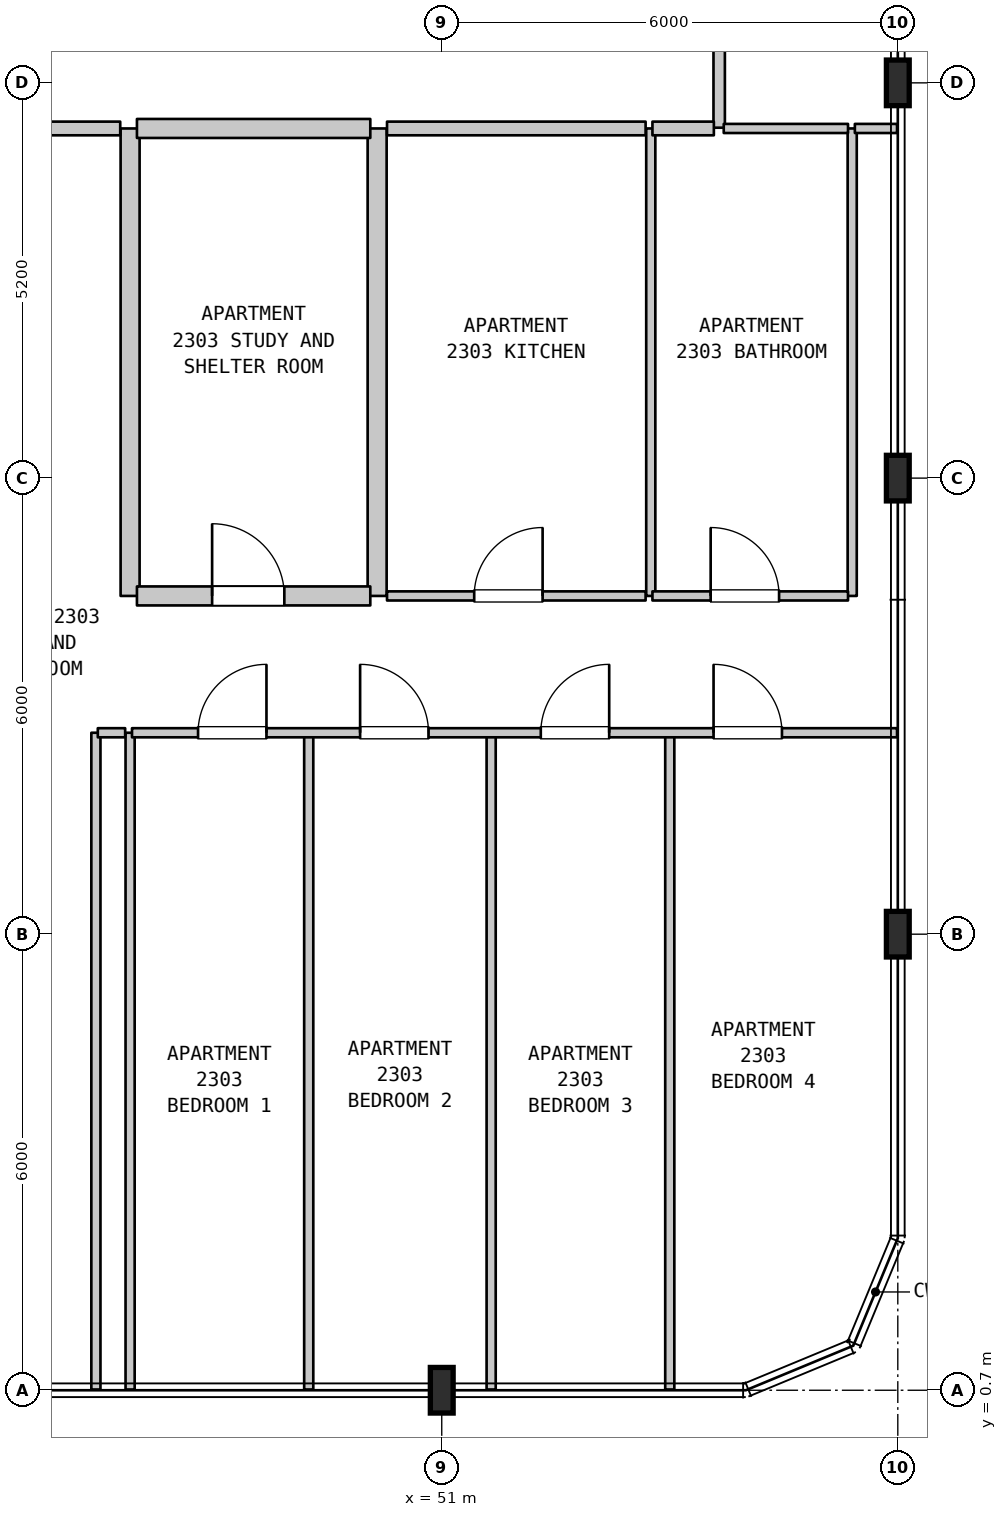
"""IFC4 building model, lengths in metres.
Left out: names, types, materials, properties, quantities, classifications, styles, units other than length and angle.
Written with IfcOpenShell. Run it as: python <this file> out.ifc"""

import sys

from ifc_helpers import new_model, si_unit, direction, frame, frame_2d, origin, origin_2d, place, context, subcontext, project, spatial, rectangle, i_section, extrude, element, fill, save


model = new_model("IFC4")
c1 = context("Model", 3, precision=1e-05, world=origin(), true_north=direction((0.0, 1.0)))
c2 = subcontext(c1, "Body", "Model", "MODEL_VIEW")
j1 = project(units=[si_unit("LENGTHUNIT", "METRE"), si_unit("PLANEANGLEUNIT", "RADIAN")], contexts=[c1])
p1 = place(None, origin())
s1 = spatial("IfcSite", under=j1, at=p1, CompositionType="ELEMENT")
p2 = place(p1, origin())
s2 = spatial("IfcBuilding", under=s1, at=p2, CompositionType="ELEMENT")
p3 = place(p2, frame((0.0, 0.0, 98.3)))
s3 = spatial("IfcBuildingStorey", under=s2, at=p3, CompositionType="ELEMENT", Elevation=98.3)
for number, where, z_axis, x_axis in (
    (1, (51.0, 0.7, 0.0), (0.0, 0.0, 1.0), (1.0, 0.0, 0.0)),
    (2, (57.0, 6.7, 0.0), (0.0, 0.0, 1.0), (1.0, 0.0, 0.0)),
    (3, (57.0, 12.7, 0.0), (0.0, 0.0, 1.0), (1.0, 0.0, 0.0)),
    (4, (57.0, 17.9, 0.0), (0.0, 0.0, 1.0), (1.0, 0.0, 0.0)),
):
    element("IfcColumn", number, at=place(p3, frame(where, z_axis=z_axis, x_axis=x_axis)), inside=s3, PredefinedType="COLUMN", context=c2, shape_type="SweptSolid", body=[
        extrude(i_section(OverallWidth=0.3, OverallDepth=0.6, WebThickness=0.015, FlangeThickness=0.03, FilletRadius=0.027, at=origin_2d()), origin(), (0.0, 0.0, 1.0), 3.7),
    ])
for number, where, z_axis, x_axis in (
    (5, (46.45, 0.71, 0.0), (0.0, 0.0, 1.0), (0.0, 1.0, 0.0)),
    (6, (46.9, 0.71, 0.0), (0.0, 0.0, 1.0), (0.0, 1.0, 0.0)),
):
    element("IfcWall", number, at=place(p3, frame(where, z_axis=z_axis, x_axis=x_axis)), inside=s3, PredefinedType="PARTITIONING", context=c2, shape_type="SweptSolid", body=[
        extrude(rectangle(XDim=8.64, YDim=0.12, at=frame_2d((4.32, 0.0))), origin(), (0.0, 0.0, 1.0), 3.385),
    ])
p4 = place(p3, frame((46.9, 11.15, 0.0), z_axis=(0.0, 0.0, 1.0), x_axis=(0.0, 1.0, 0.0)))
e7 = element("IfcWall", 7, at=p4, inside=s3, PredefinedType="STANDARD", context=c2, shape_type="SweptSolid", body=[
    extrude(rectangle(XDim=6.15, YDim=0.25, at=frame_2d((3.075, 0.0))), origin(), (0.0, 0.0, 1.0), 3.385),
])
p5 = place(p3, frame((49.25, 0.71, 0.0), z_axis=(0.0, 0.0, 1.0), x_axis=(0.0, 1.0, 0.0)))
e8 = element("IfcWall", 8, at=p5, inside=s3, PredefinedType="PARTITIONING", context=c2, shape_type="SweptSolid", body=[
    extrude(rectangle(XDim=8.64, YDim=0.12, at=frame_2d((4.32, 0.0))), origin(), (0.0, 0.0, 1.0), 3.385),
])
p6 = place(p3, frame((50.15, 11.15, 0.0), z_axis=(0.0, 0.0, 1.0), x_axis=(0.0, 1.0, 0.0)))
e9 = element("IfcWall", 9, at=p6, inside=s3, PredefinedType="STANDARD", context=c2, shape_type="SweptSolid", body=[
    extrude(rectangle(XDim=6.15, YDim=0.25, at=frame_2d((3.075, 0.0))), origin(), (0.0, 0.0, 1.0), 3.385),
])
p7 = place(p3, frame((51.65, 0.71, 0.0), z_axis=(0.0, 0.0, 1.0), x_axis=(0.0, 1.0, 0.0)))
e10 = element("IfcWall", 10, at=p7, inside=s3, PredefinedType="PARTITIONING", context=c2, shape_type="SweptSolid", body=[
    extrude(rectangle(XDim=8.64, YDim=0.12, at=frame_2d((4.32, 0.0))), origin(), (0.0, 0.0, 1.0), 3.385),
])
p8 = place(p3, frame((53.75, 11.15, 0.0), z_axis=(0.0, 0.0, 1.0), x_axis=(0.0, 1.0, 0.0)))
e11 = element("IfcWall", 11, at=p8, inside=s3, PredefinedType="PARTITIONING", context=c2, shape_type="SweptSolid", body=[
    extrude(rectangle(XDim=6.15, YDim=0.12, at=frame_2d((3.075, 0.0))), origin(), (0.0, 0.0, 1.0), 3.385),
])
p9 = place(p3, frame((54.0, 0.71, 0.0), z_axis=(0.0, 0.0, 1.0), x_axis=(0.0, 1.0, 0.0)))
e12 = element("IfcWall", 12, at=p9, inside=s3, PredefinedType="PARTITIONING", context=c2, shape_type="SweptSolid", body=[
    extrude(rectangle(XDim=8.64, YDim=0.12, at=frame_2d((4.32, 0.0))), origin(), (0.0, 0.0, 1.0), 3.385),
])
p10 = place(p3, frame((54.65, 17.31, 0.0), z_axis=(0.0, 0.0, 1.0), x_axis=(0.0, 1.0, 0.0)))
e13 = element("IfcWall", 13, at=p10, inside=s3, PredefinedType="STANDARD", context=c2, shape_type="SweptSolid", body=[
    extrude(rectangle(XDim=2.19, YDim=0.15, at=frame_2d((1.095, 0.0))), origin(), (0.0, 0.0, 1.0), 3.385),
])
p11 = place(p3, frame((56.4, 11.15, 0.0), z_axis=(0.0, 0.0, 1.0), x_axis=(0.0, 1.0, 0.0)))
e14 = element("IfcWall", 14, at=p11, inside=s3, PredefinedType="PARTITIONING", context=c2, shape_type="SweptSolid", body=[
    extrude(rectangle(XDim=6.15, YDim=0.12, at=frame_2d((3.075, 0.0))), origin(), (0.0, 0.0, 1.0), 3.385),
])
p12 = place(p3, frame((46.475, 9.35, 0.0), z_axis=(0.0, 0.0, 1.0), x_axis=(1.0, 0.0, 0.0)))
e15 = element("IfcWall", 15, at=p12, inside=s3, PredefinedType="PARTITIONING", context=c2, shape_type="SweptSolid", body=[
    extrude(rectangle(XDim=0.36, YDim=0.12, at=frame_2d((0.18, 0.0))), origin(), (0.0, 0.0, 1.0), 3.385),
])
p13 = place(p3, frame((46.925, 9.35, 0.0), z_axis=(0.0, 0.0, 1.0), x_axis=(1.0, 0.0, 0.0)))
e16 = element("IfcWall", 16, at=p13, inside=s3, PredefinedType="PARTITIONING", context=c2, shape_type="SweptSolid", body=[
    extrude(rectangle(XDim=10.065, YDim=0.12, at=frame_2d((5.032, 0.0))), origin(), (0.0, 0.0, 1.0), 3.385),
])
p14 = place(p13, frame((0.869, 0.0, 0.0)))
e17 = element("IfcOpeningElement", 17, at=p14, cuts=e16, PredefinedType="OPENING", context=c2, shape_type="SweptSolid", body=[
    extrude(rectangle(XDim=0.9, YDim=2.15, at=frame_2d((0.45, 1.075))), frame((0.0, 0.07, 0.0), z_axis=(0.0, -1.0, 0.0), x_axis=(1.0, 0.0, 0.0)), (0.0, 0.0, 1.0), 0.14),
])
p15 = place(p13, frame((3.001, 0.0, 0.0)))
e18 = element("IfcOpeningElement", 18, at=p15, cuts=e16, PredefinedType="OPENING", context=c2, shape_type="SweptSolid", body=[
    extrude(rectangle(XDim=0.9, YDim=2.15, at=frame_2d((0.45, 1.075))), frame((0.0, 0.07, 0.0), z_axis=(0.0, -1.0, 0.0), x_axis=(1.0, 0.0, 0.0)), (0.0, 0.0, 1.0), 0.14),
])
p16 = place(p13, frame((5.378, 0.0, 0.0)))
e19 = element("IfcOpeningElement", 19, at=p16, cuts=e16, PredefinedType="OPENING", context=c2, shape_type="SweptSolid", body=[
    extrude(rectangle(XDim=0.9, YDim=2.15, at=frame_2d((0.45, 1.075))), frame((0.0, 0.07, 0.0), z_axis=(0.0, -1.0, 0.0), x_axis=(1.0, 0.0, 0.0)), (0.0, 0.0, 1.0), 0.14),
])
p17 = place(p13, frame((7.651, 0.0, 0.0)))
e20 = element("IfcOpeningElement", 20, at=p17, cuts=e16, PredefinedType="OPENING", context=c2, shape_type="SweptSolid", body=[
    extrude(rectangle(XDim=0.9, YDim=2.15, at=frame_2d((0.45, 1.075))), frame((0.0, 0.07, 0.0), z_axis=(0.0, -1.0, 0.0), x_axis=(1.0, 0.0, 0.0)), (0.0, 0.0, 1.0), 0.14),
])
p18 = place(p3, frame((46.99, 11.15, 0.0), z_axis=(0.0, 0.0, 1.0), x_axis=(1.0, 0.0, 0.0)))
e21 = element("IfcWall", 21, at=p18, inside=s3, PredefinedType="STANDARD", context=c2, shape_type="SweptSolid", body=[
    extrude(rectangle(XDim=3.07, YDim=0.25, at=frame_2d((1.535, 0.0))), origin(), (0.0, 0.0, 1.0), 3.385),
])
p19 = place(p18, frame((0.989, 0.0, 0.0)))
e22 = element("IfcOpeningElement", 22, at=p19, cuts=e21, PredefinedType="OPENING", context=c2, shape_type="SweptSolid", body=[
    extrude(rectangle(XDim=0.95, YDim=2.15, at=frame_2d((0.475, 1.075))), frame((0.0, 0.135, 0.0), z_axis=(0.0, -1.0, 0.0), x_axis=(1.0, 0.0, 0.0)), (0.0, 0.0, 1.0), 0.27),
])
p20 = place(p3, frame((50.28, 11.15, 0.0), z_axis=(0.0, 0.0, 1.0), x_axis=(1.0, 0.0, 0.0)))
e23 = element("IfcWall", 23, at=p20, inside=s3, PredefinedType="PARTITIONING", context=c2, shape_type="SweptSolid", body=[
    extrude(rectangle(XDim=3.402, YDim=0.12, at=frame_2d((1.701, 0.0))), origin(), (0.0, 0.0, 1.0), 3.385),
])
p21 = place(p20, frame((1.147, 0.0, 0.0)))
e24 = element("IfcOpeningElement", 24, at=p21, cuts=e23, PredefinedType="OPENING", context=c2, shape_type="SweptSolid", body=[
    extrude(rectangle(XDim=0.9, YDim=2.15, at=frame_2d((0.45, 1.075))), frame((0.0, 0.07, 0.0), z_axis=(0.0, -1.0, 0.0), x_axis=(1.0, 0.0, 0.0)), (0.0, 0.0, 1.0), 0.14),
])
p22 = place(p3, frame((53.772, 11.15, 0.0), z_axis=(0.0, 0.0, 1.0), x_axis=(1.0, 0.0, 0.0)))
e25 = element("IfcWall", 25, at=p22, inside=s3, PredefinedType="PARTITIONING", context=c2, shape_type="SweptSolid", body=[
    extrude(rectangle(XDim=2.573, YDim=0.12, at=frame_2d((1.287, 0.0))), origin(), (0.0, 0.0, 1.0), 3.385),
])
p23 = place(p22, frame((0.766, 0.0, 0.0)))
e26 = element("IfcOpeningElement", 26, at=p23, cuts=e25, PredefinedType="OPENING", context=c2, shape_type="SweptSolid", body=[
    extrude(rectangle(XDim=0.9, YDim=2.1, at=frame_2d((0.45, 1.05))), frame((0.0, 0.07, 0.0), z_axis=(0.0, -1.0, 0.0), x_axis=(1.0, 0.0, 0.0)), (0.0, 0.0, 1.0), 0.14),
])
p24 = place(p3, frame((41.225, 17.3, 0.0), z_axis=(0.0, 0.0, 1.0), x_axis=(1.0, 0.0, 0.0)))
e27 = element("IfcWall", 27, at=p24, inside=s3, PredefinedType="STANDARD", context=c2, shape_type="SweptSolid", body=[
    extrude(rectangle(XDim=5.545, YDim=0.18, at=frame_2d((2.772, 0.0))), origin(), (0.0, 0.0, 1.0), 3.385),
])
p25 = place(p24, frame((2.435, 0.0, 0.0)))
e28 = element("IfcOpeningElement", 28, at=p25, cuts=e27, PredefinedType="OPENING", context=c2, shape_type="SweptSolid", body=[
    extrude(rectangle(XDim=1.0, YDim=2.15, at=frame_2d((0.5, 1.075))), frame((0.0, 0.1, 0.0), z_axis=(0.0, -1.0, 0.0), x_axis=(1.0, 0.0, 0.0)), (0.0, 0.0, 1.0), 0.2),
])
p26 = place(p3, frame((46.99, 17.3, 0.0), z_axis=(0.0, 0.0, 1.0), x_axis=(1.0, 0.0, 0.0)))
e29 = element("IfcWall", 29, at=p26, inside=s3, PredefinedType="STANDARD", context=c2, shape_type="SweptSolid", body=[
    extrude(rectangle(XDim=3.07, YDim=0.25, at=frame_2d((1.535, 0.0))), origin(), (0.0, 0.0, 1.0), 3.385),
])
p27 = place(p3, frame((50.28, 17.3, 0.0), z_axis=(0.0, 0.0, 1.0), x_axis=(1.0, 0.0, 0.0)))
e30 = element("IfcWall", 30, at=p27, inside=s3, PredefinedType="STANDARD", context=c2, shape_type="SweptSolid", body=[
    extrude(rectangle(XDim=3.402, YDim=0.18, at=frame_2d((1.701, 0.0))), origin(), (0.0, 0.0, 1.0), 3.385),
])
p28 = place(p3, frame((53.772, 17.3, 0.0), z_axis=(0.0, 0.0, 1.0), x_axis=(1.0, 0.0, 0.0)))
e31 = element("IfcWall", 31, at=p28, inside=s3, PredefinedType="STANDARD", context=c2, shape_type="SweptSolid", body=[
    extrude(rectangle(XDim=0.808, YDim=0.18, at=frame_2d((0.404, 0.0))), origin(), (0.0, 0.0, 1.0), 3.385),
])
p29 = place(p3, frame((54.71, 17.3, 0.0), z_axis=(0.0, 0.0, 1.0), x_axis=(1.0, 0.0, 0.0)))
e32 = element("IfcWall", 32, at=p29, inside=s3, PredefinedType="PARTITIONING", context=c2, shape_type="SweptSolid", body=[
    extrude(rectangle(XDim=1.635, YDim=0.12, at=frame_2d((0.817, 0.0))), origin(), (0.0, 0.0, 1.0), 3.385),
])
p30 = place(p3, frame((56.435, 17.3, 0.0), z_axis=(0.0, 0.0, 1.0), x_axis=(1.0, 0.0, 0.0)))
e33 = element("IfcWall", 33, at=p30, inside=s3, PredefinedType="PARTITIONING", context=c2, shape_type="SweptSolid", body=[
    extrude(rectangle(XDim=0.555, YDim=0.12, at=frame_2d((0.277, 0.0))), origin(), (0.0, 0.0, 1.0), 3.385),
])
p31 = place(p14, origin())
e34 = element("IfcDoor", 34, at=p31, inside=s3, OperationType="SINGLE_SWING_RIGHT", PredefinedType="DOOR", context=c2, shape_type="SweptSolid", body=[
    extrude(rectangle(XDim=0.9, YDim=2.15, at=frame_2d((0.45, 1.075))), frame((0.0, 0.025, 0.0), z_axis=(0.0, -1.0, 0.0), x_axis=(1.0, 0.0, 0.0)), (0.0, 0.0, 1.0), 0.05),
])
fill(e17, e34)
p32 = place(p15, origin())
e35 = element("IfcDoor", 35, at=p32, inside=s3, OperationType="SINGLE_SWING_LEFT", PredefinedType="DOOR", context=c2, shape_type="SweptSolid", body=[
    extrude(rectangle(XDim=0.9, YDim=2.15, at=frame_2d((0.45, 1.075))), frame((0.0, 0.025, 0.0), z_axis=(0.0, -1.0, 0.0), x_axis=(1.0, 0.0, 0.0)), (0.0, 0.0, 1.0), 0.05),
])
fill(e18, e35)
p33 = place(p16, origin())
e36 = element("IfcDoor", 36, at=p33, inside=s3, OperationType="SINGLE_SWING_RIGHT", PredefinedType="DOOR", context=c2, shape_type="SweptSolid", body=[
    extrude(rectangle(XDim=0.9, YDim=2.15, at=frame_2d((0.45, 1.075))), frame((0.0, 0.025, 0.0), z_axis=(0.0, -1.0, 0.0), x_axis=(1.0, 0.0, 0.0)), (0.0, 0.0, 1.0), 0.05),
])
fill(e19, e36)
p34 = place(p17, origin())
e37 = element("IfcDoor", 37, at=p34, inside=s3, OperationType="SINGLE_SWING_LEFT", PredefinedType="DOOR", context=c2, shape_type="SweptSolid", body=[
    extrude(rectangle(XDim=0.9, YDim=2.15, at=frame_2d((0.45, 1.075))), frame((0.0, 0.025, 0.0), z_axis=(0.0, -1.0, 0.0), x_axis=(1.0, 0.0, 0.0)), (0.0, 0.0, 1.0), 0.05),
])
fill(e20, e37)
p35 = place(p19, origin())
e38 = element("IfcDoor", 38, at=p35, inside=s3, OperationType="SINGLE_SWING_LEFT", PredefinedType="DOOR", context=c2, shape_type="SweptSolid", body=[
    extrude(rectangle(XDim=0.95, YDim=2.15, at=frame_2d((0.475, 1.075))), frame((0.0, 0.025, 0.0), z_axis=(0.0, -1.0, 0.0), x_axis=(1.0, 0.0, 0.0)), (0.0, 0.0, 1.0), 0.05),
])
fill(e22, e38)
p36 = place(p21, origin())
e39 = element("IfcDoor", 39, at=p36, inside=s3, OperationType="SINGLE_SWING_RIGHT", PredefinedType="DOOR", context=c2, shape_type="SweptSolid", body=[
    extrude(rectangle(XDim=0.9, YDim=2.15, at=frame_2d((0.45, 1.075))), frame((0.0, 0.025, 0.0), z_axis=(0.0, -1.0, 0.0), x_axis=(1.0, 0.0, 0.0)), (0.0, 0.0, 1.0), 0.05),
])
fill(e24, e39)
p37 = place(p23, origin())
e40 = element("IfcDoor", 40, at=p37, inside=s3, OperationType="SINGLE_SWING_LEFT", PredefinedType="DOOR", context=c2, shape_type="SweptSolid", body=[
    extrude(rectangle(XDim=0.9, YDim=2.1, at=frame_2d((0.45, 1.05))), frame((0.0, 0.025, 0.0), z_axis=(0.0, -1.0, 0.0), x_axis=(1.0, 0.0, 0.0)), (0.0, 0.0, 1.0), 0.05),
])
fill(e26, e40)
save(model, sys.argv[1])
